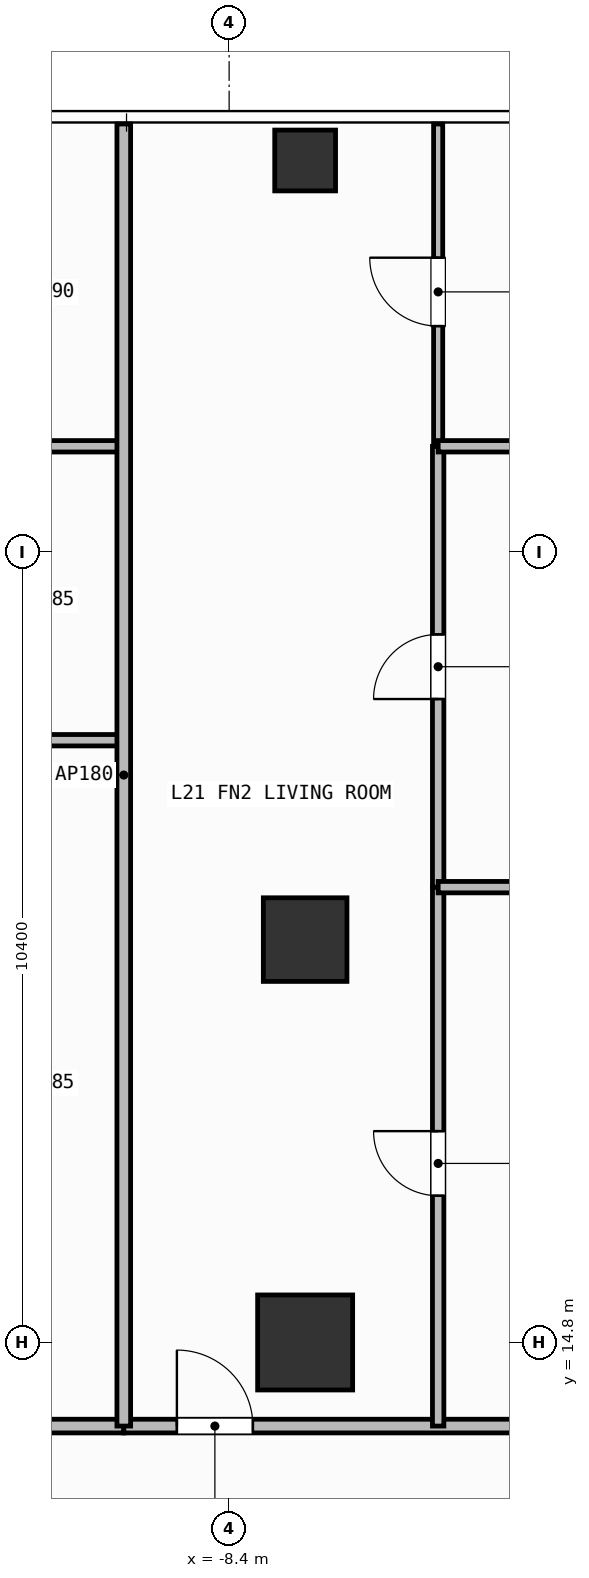
"""IFC4 building model, lengths in metres.
Left out: names, types, materials, properties, quantities, classifications, styles, units other than length and angle.
Written with IfcOpenShell. Run it as: python <this file> out.ifc"""

import sys

from ifc_helpers import new_model, si_unit, direction, frame, frame_2d, origin, origin_2d, place, context, subcontext, project, spatial, rectangle, hollow_rectangle, extrude, element, fill, save


model = new_model("IFC4")
c1 = context("Model", 3, precision=1e-05, world=origin(), true_north=direction((0.0, 1.0)))
c2 = subcontext(c1, "Body", "Model", "MODEL_VIEW")
j1 = project(units=[si_unit("LENGTHUNIT", "METRE"), si_unit("PLANEANGLEUNIT", "RADIAN")], contexts=[c1])
p1 = place(None, origin())
s1 = spatial("IfcSite", under=j1, at=p1, CompositionType="ELEMENT")
p2 = place(p1, origin())
s2 = spatial("IfcBuilding", under=s1, at=p2, CompositionType="ELEMENT")
p3 = place(p2, frame((0.0, 0.0, 85.2)))
s3 = spatial("IfcBuildingStorey", under=s2, at=p3, CompositionType="ELEMENT", Elevation=85.2)
p4 = place(p3, frame((-7.4, 14.8, 0.0), z_axis=(0.0, 0.0, 1.0), x_axis=(1.0, 0.0, 0.0)))
e1 = element("IfcColumn", 1, at=p4, inside=s3, PredefinedType="COLUMN", context=c2, shape_type="SweptSolid", body=[
    extrude(rectangle(XDim=1.25, YDim=1.25, at=origin_2d()), origin(), (0.0, 0.0, 1.0), 3.9),
])
p5 = place(p3, frame((-7.4, 20.1, 0.0), z_axis=(0.0, 0.0, 1.0), x_axis=(1.0, 0.0, 0.0)))
e2 = element("IfcColumn", 2, at=p5, inside=s3, PredefinedType="COLUMN", context=c2, shape_type="SweptSolid", body=[
    extrude(rectangle(XDim=1.1, YDim=1.1, at=origin_2d()), origin(), (0.0, 0.0, 1.0), 3.9),
])
p6 = place(p3, frame((-7.4, 30.35, 0.0), z_axis=(0.0, 0.0, 1.0), x_axis=(1.0, 0.0, 0.0)))
e3 = element("IfcColumn", 3, at=p6, inside=s3, PredefinedType="COLUMN", context=c2, shape_type="SweptSolid", body=[
    extrude(hollow_rectangle(XDim=0.8, YDim=0.8, WallThickness=0.036, at=origin_2d()), origin(), (0.0, 0.0, 1.0), 3.9),
])
p7 = place(p3, frame((-24.42, 13.7, 0.0), z_axis=(0.0, 0.0, 1.0), x_axis=(1.0, 0.0, 0.0)))
e4 = element("IfcWall", 4, at=p7, inside=s3, PredefinedType="PARTITIONING", context=c2, shape_type="SweptSolid", body=[
    extrude(rectangle(XDim=14.634, YDim=0.18, at=frame_2d((7.317, 0.0))), origin(), (0.0, 0.0, 1.0), 3.68),
])
p8 = place(p7, frame((6.457, 0.0, 0.0)))
e5 = element("IfcOpeningElement", 5, at=p8, cuts=e4, PredefinedType="OPENING", context=c2, shape_type="SweptSolid", body=[
    extrude(rectangle(XDim=1.0, YDim=2.2, at=frame_2d((0.5, 1.1))), frame((0.0, 0.1, 0.0), z_axis=(0.0, -1.0, 0.0), x_axis=(1.0, 0.0, 0.0)), (0.0, 0.0, 1.0), 0.2),
])
p9 = place(p3, frame((-9.786, 13.7, 0.0), z_axis=(0.0, 0.0, 1.0), x_axis=(1.0, 0.0, 0.0)))
e6 = element("IfcWall", 6, at=p9, inside=s3, PredefinedType="PARTITIONING", context=c2, shape_type="SweptSolid", body=[
    extrude(rectangle(XDim=6.886, YDim=0.18, at=frame_2d((3.443, 0.0))), origin(), (0.0, 0.0, 1.0), 3.68),
])
p10 = place(p9, frame((0.698, 0.0, 0.0)))
e7 = element("IfcOpeningElement", 7, at=p10, cuts=e6, PredefinedType="OPENING", context=c2, shape_type="SweptSolid", body=[
    extrude(rectangle(XDim=1.0, YDim=2.2, at=frame_2d((0.5, 1.1))), frame((0.0, 0.1, 0.0), z_axis=(0.0, -1.0, 0.0), x_axis=(1.0, 0.0, 0.0)), (0.0, 0.0, 1.0), 0.2),
])
p11 = place(p3, frame((-5.65, 13.7, 0.0), z_axis=(0.0, 0.0, 1.0), x_axis=(0.0, 1.0, 0.0)))
e8 = element("IfcWall", 8, at=p11, inside=s3, PredefinedType="PARTITIONING", context=c2, shape_type="SweptSolid", body=[
    extrude(rectangle(XDim=7.09, YDim=0.15, at=frame_2d((3.545, 0.0))), origin(), (0.0, 0.0, 1.0), 3.68),
])
p12 = place(p11, frame((3.03, 0.0, 0.0)))
e9 = element("IfcOpeningElement", 9, at=p12, cuts=e8, PredefinedType="OPENING", context=c2, shape_type="SweptSolid", body=[
    extrude(rectangle(XDim=0.85, YDim=2.1, at=frame_2d((0.425, 1.05))), frame((0.0, 0.085, 0.0), z_axis=(0.0, -1.0, 0.0), x_axis=(1.0, 0.0, 0.0)), (0.0, 0.0, 1.0), 0.17),
])
p13 = place(p3, frame((-5.65, 20.79, 0.0), z_axis=(0.0, 0.0, 1.0), x_axis=(0.0, 1.0, 0.0)))
e10 = element("IfcWall", 10, at=p13, inside=s3, PredefinedType="PARTITIONING", context=c2, shape_type="SweptSolid", body=[
    extrude(rectangle(XDim=5.8, YDim=0.15, at=frame_2d((2.9, 0.0))), origin(), (0.0, 0.0, 1.0), 3.68),
])
p14 = place(p13, frame((2.475, 0.0, 0.0)))
e11 = element("IfcOpeningElement", 11, at=p14, cuts=e10, PredefinedType="OPENING", context=c2, shape_type="SweptSolid", body=[
    extrude(rectangle(XDim=0.85, YDim=2.1, at=frame_2d((0.425, 1.05))), frame((0.0, 0.085, 0.0), z_axis=(0.0, -1.0, 0.0), x_axis=(1.0, 0.0, 0.0)), (0.0, 0.0, 1.0), 0.17),
])
p15 = place(p3, frame((-5.65, 26.59, 0.0), z_axis=(0.0, 0.0, 1.0), x_axis=(0.0, 1.0, 0.0)))
e12 = element("IfcWall", 12, at=p15, inside=s3, PredefinedType="PARTITIONING", context=c2, shape_type="SweptSolid", body=[
    extrude(rectangle(XDim=4.24, YDim=0.12, at=frame_2d((2.12, 0.0))), origin(), (0.0, 0.0, 1.0), 3.68),
])
p16 = place(p15, frame((1.581, 0.0, 0.0)))
e13 = element("IfcOpeningElement", 13, at=p16, cuts=e12, PredefinedType="OPENING", context=c2, shape_type="SweptSolid", body=[
    extrude(rectangle(XDim=0.9, YDim=2.1, at=frame_2d((0.45, 1.05))), frame((0.0, 0.07, 0.0), z_axis=(0.0, -1.0, 0.0), x_axis=(1.0, 0.0, 0.0)), (0.0, 0.0, 1.0), 0.14),
])
for number, where, z_axis, x_axis in (
    (14, (-12.873, 22.723, 0.0), (0.0, 0.0, 1.0), (1.0, 0.0, 0.0)),
    (15, (-12.873, 26.59, 0.0), (0.0, 0.0, 1.0), (1.0, 0.0, 0.0)),
):
    element("IfcWall", number, at=place(p3, frame(where, z_axis=z_axis, x_axis=x_axis)), inside=s3, PredefinedType="PARTITIONING", context=c2, shape_type="SweptSolid", body=[
        extrude(rectangle(XDim=3.087, YDim=0.15, at=frame_2d((1.543, 0.0))), origin(), (0.0, 0.0, 1.0), 3.68),
    ])
for number, where, z_axis, x_axis in (
    (16, (-5.65, 20.79, 0.0), (0.0, 0.0, 1.0), (1.0, 0.0, 0.0)),
    (17, (-5.65, 26.59, 0.0), (0.0, 0.0, 1.0), (1.0, 0.0, 0.0)),
):
    element("IfcWall", number, at=place(p3, frame(where, z_axis=z_axis, x_axis=x_axis)), inside=s3, PredefinedType="PARTITIONING", context=c2, shape_type="SweptSolid", body=[
        extrude(rectangle(XDim=2.75, YDim=0.15, at=frame_2d((1.375, 0.0))), origin(), (0.0, 0.0, 1.0), 3.68),
    ])
p17 = place(p3, frame((-9.786, 13.7, 0.0), z_axis=(0.0, 0.0, 1.0), x_axis=(0.0, 1.0, 0.0)))
e18 = element("IfcWall", 18, at=p17, inside=s3, PredefinedType="PARTITIONING", context=c2, shape_type="SweptSolid", body=[
    extrude(rectangle(XDim=17.13, YDim=0.18, at=frame_2d((8.565, 0.0))), origin(), (0.0, 0.0, 1.0), 3.68),
])
p18 = place(p10, origin())
e19 = element("IfcDoor", 19, at=p18, inside=s3, OperationType="SINGLE_SWING_LEFT", PredefinedType="DOOR", context=c2, shape_type="SweptSolid", body=[
    extrude(rectangle(XDim=1.0, YDim=2.2, at=frame_2d((0.5, 1.1))), frame((0.0, 0.025, 0.0), z_axis=(0.0, -1.0, 0.0), x_axis=(1.0, 0.0, 0.0)), (0.0, 0.0, 1.0), 0.05),
])
fill(e7, e19)
p19 = place(p12, origin())
e20 = element("IfcDoor", 20, at=p19, inside=s3, OperationType="SINGLE_SWING_RIGHT", PredefinedType="DOOR", context=c2, shape_type="SweptSolid", body=[
    extrude(rectangle(XDim=0.85, YDim=2.1, at=frame_2d((0.425, 1.05))), frame((0.0, 0.025, 0.0), z_axis=(0.0, -1.0, 0.0), x_axis=(1.0, 0.0, 0.0)), (0.0, 0.0, 1.0), 0.05),
])
fill(e9, e20)
p20 = place(p14, origin())
e21 = element("IfcDoor", 21, at=p20, inside=s3, OperationType="SINGLE_SWING_LEFT", PredefinedType="DOOR", context=c2, shape_type="SweptSolid", body=[
    extrude(rectangle(XDim=0.85, YDim=2.1, at=frame_2d((0.425, 1.05))), frame((0.0, 0.025, 0.0), z_axis=(0.0, -1.0, 0.0), x_axis=(1.0, 0.0, 0.0)), (0.0, 0.0, 1.0), 0.05),
])
fill(e11, e21)
p21 = place(p16, origin())
e22 = element("IfcDoor", 22, at=p21, inside=s3, OperationType="SINGLE_SWING_RIGHT", PredefinedType="DOOR", context=c2, shape_type="SweptSolid", body=[
    extrude(rectangle(XDim=0.9, YDim=2.1, at=frame_2d((0.45, 1.05))), frame((0.0, 0.025, 0.0), z_axis=(0.0, -1.0, 0.0), x_axis=(1.0, 0.0, 0.0)), (0.0, 0.0, 1.0), 0.05),
])
fill(e13, e22)
save(model, sys.argv[1])
